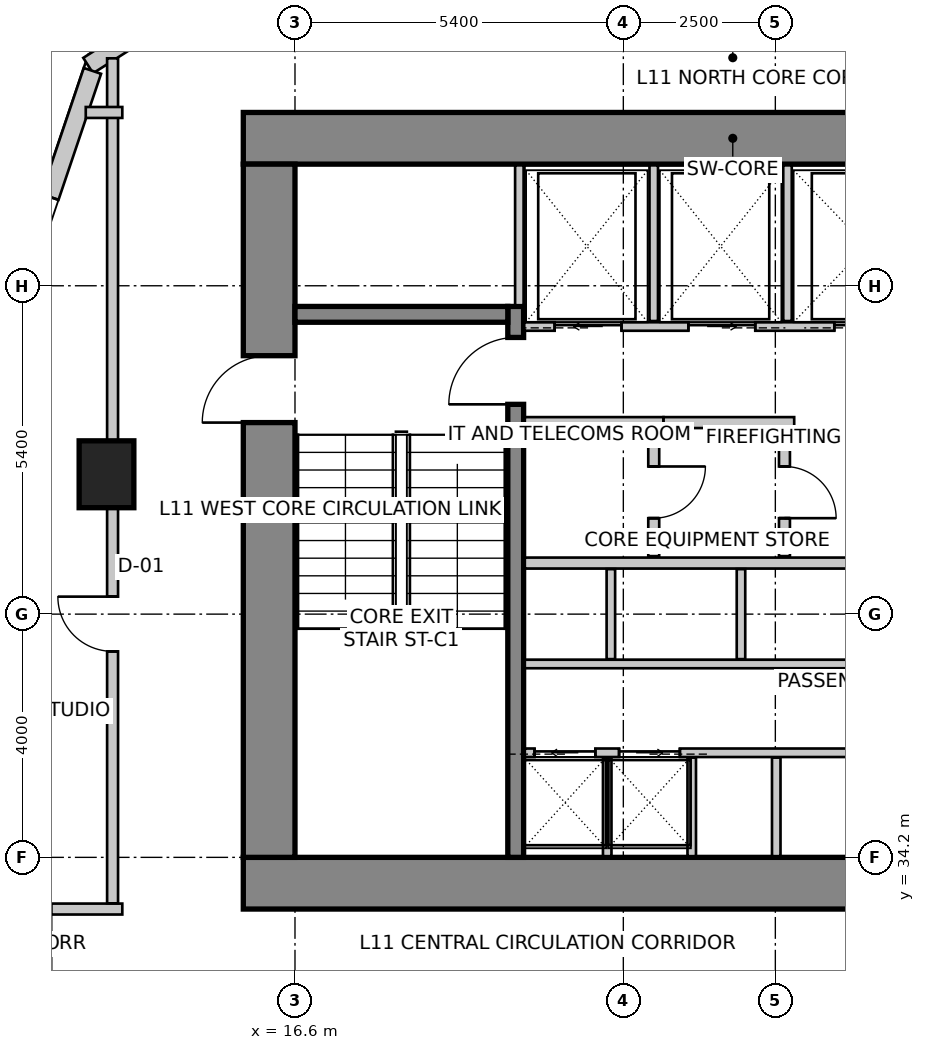
"""IFC4 building model, lengths in metres.
Left out: names, types, materials, properties, quantities, classifications, styles, units other than length and angle.
Written with IfcOpenShell. Run it as: python <this file> out.ifc"""

import sys

from ifc_helpers import new_model, si_unit, direction, frame, frame_2d, origin, origin_2d, place, context, subcontext, project, spatial, rectangle, extrude, source, transform, mapped, element, fill, save


model = new_model("IFC4")
c1 = context("Model", 3, precision=1e-05, world=origin(), true_north=direction((0.0, 1.0)))
c2 = subcontext(c1, "Body", "Model", "MODEL_VIEW")
j1 = project(units=[si_unit("LENGTHUNIT", "METRE"), si_unit("PLANEANGLEUNIT", "RADIAN")], contexts=[c1])
p1 = place(None, origin())
s1 = spatial("IfcSite", under=j1, at=p1, CompositionType="ELEMENT")
p2 = place(p1, origin())
s2 = spatial("IfcBuilding", under=s1, at=p2, CompositionType="ELEMENT")
p3 = place(p2, frame((0.0, 0.0, 47.0)))
s3 = spatial("IfcBuildingStorey", under=s2, at=p3, CompositionType="ELEMENT", Elevation=47.0)
p4 = place(p3, frame((15.75, 46.025, 0.0), z_axis=(0.0, 0.0, 1.0), x_axis=(1.0, 0.0, 0.0)))
e1 = element("IfcWall", 1, at=p4, inside=s3, PredefinedType="SHEAR", context=c2, shape_type="SweptSolid", body=[
    extrude(rectangle(XDim=16.1, YDim=0.85, at=frame_2d((8.05, 0.0))), origin(), (0.0, 0.0, 1.0), 4.0),
])
p5 = place(p3, frame((15.75, 33.775, 0.0), z_axis=(0.0, 0.0, 1.0), x_axis=(1.0, 0.0, 0.0)))
e2 = element("IfcWall", 2, at=p5, inside=s3, PredefinedType="SHEAR", context=c2, shape_type="SweptSolid", body=[
    extrude(rectangle(XDim=16.1, YDim=0.85, at=frame_2d((8.05, 0.0))), origin(), (0.0, 0.0, 1.0), 4.0),
])
m1 = source(origin(), c2, "Body", "SweptSolid", [
    extrude(rectangle(XDim=1.3, YDim=2.15, at=frame_2d((0.65, 1.075))), frame((0.0, 0.435, 0.0), z_axis=(0.0, -1.0, 0.0), x_axis=(1.0, 0.0, 0.0)), (0.0, 0.0, 1.0), 0.87),
])
p6 = place(p5, frame((10.18, 0.0, 0.0)))
e3 = element("IfcOpeningElement", 3, at=p6, cuts=e2, PredefinedType="OPENING", context=c2, shape_type="MappedRepresentation", body=[
    mapped(m1, transform((0.0, 0.0, 0.0), scale=1.0)),
])
p7 = place(p3, frame((16.175, 34.2, 0.0), z_axis=(0.0, 0.0, 1.0), x_axis=(0.0, 1.0, 0.0)))
e4 = element("IfcWall", 4, at=p7, inside=s3, PredefinedType="SHEAR", context=c2, shape_type="SweptSolid", body=[
    extrude(rectangle(XDim=11.4, YDim=0.85, at=frame_2d((5.7, 0.0))), origin(), (0.0, 0.0, 1.0), 4.0),
])
m2 = source(origin(), c2, "Body", "SweptSolid", [
    extrude(rectangle(XDim=1.1, YDim=2.15, at=frame_2d((0.55, 1.075))), frame((0.0, 0.435, 0.0), z_axis=(0.0, -1.0, 0.0), x_axis=(1.0, 0.0, 0.0)), (0.0, 0.0, 1.0), 0.87),
])
p8 = place(p7, frame((7.15, 0.0, 0.0)))
e5 = element("IfcOpeningElement", 5, at=p8, cuts=e4, PredefinedType="OPENING", context=c2, shape_type="MappedRepresentation", body=[
    mapped(m2, transform((0.0, 0.0, 0.0), scale=1.0)),
])
p9 = place(p3, frame((20.23, 34.2, 0.0), z_axis=(0.0, 0.0, 1.0), x_axis=(0.0, 1.0, 0.0)))
e6 = element("IfcWall", 6, at=p9, inside=s3, PredefinedType="SHEAR", context=c2, shape_type="SweptSolid", body=[
    extrude(rectangle(XDim=9.06, YDim=0.26, at=frame_2d((4.53, 0.0))), origin(), (0.0, 0.0, 1.0), 4.0),
])
m3 = source(origin(), c2, "Body", "SweptSolid", [
    extrude(rectangle(XDim=1.1, YDim=2.15, at=frame_2d((0.55, 1.075))), frame((0.0, 0.14, 0.0), z_axis=(0.0, -1.0, 0.0), x_axis=(1.0, 0.0, 0.0)), (0.0, 0.0, 1.0), 0.28),
])
p10 = place(p9, frame((7.45, 0.0, 0.0)))
e7 = element("IfcOpeningElement", 7, at=p10, cuts=e6, PredefinedType="OPENING", context=c2, shape_type="MappedRepresentation", body=[
    mapped(m3, transform((0.0, 0.0, 0.0), scale=1.0)),
])
p11 = place(p3, frame((16.6, 43.13, 0.0), z_axis=(0.0, 0.0, 1.0), x_axis=(1.0, 0.0, 0.0)))
e8 = element("IfcWall", 8, at=p11, inside=s3, PredefinedType="SHEAR", context=c2, shape_type="SweptSolid", body=[
    extrude(rectangle(XDim=3.5, YDim=0.26, at=frame_2d((1.75, 0.0))), origin(), (0.0, 0.0, 1.0), 4.0),
])
m4 = source(origin(), c2, "Body", "SweptSolid", [
    extrude(rectangle(XDim=0.9, YDim=1.1, at=origin_2d()), origin(), (0.0, 0.0, 1.0), 4.0),
])
p12 = place(p3, frame((13.5, 40.5, 0.0), z_axis=(0.0, 0.0, 1.0), x_axis=(1.0, 0.0, 0.0)))
e9 = element("IfcColumn", 9, at=p12, inside=s3, PredefinedType="COLUMN", context=c2, shape_type="MappedRepresentation", body=[
    mapped(m4, transform((0.0, 0.0, 0.0), scale=1.0)),
])
p13 = place(p3, frame((58.761, 46.648, 0.0), z_axis=(0.0, 0.0, 1.0), x_axis=(-0.98607502735, 0.166301053624, 0.0)))
e10 = element("IfcWall", 10, at=p13, inside=s3, PredefinedType="SOLIDWALL", context=c2, shape_type="SweptSolid", body=[
    extrude(rectangle(XDim=37.397, YDim=0.3, at=frame_2d((18.699, 0.0))), origin(), (0.0, 0.0, 1.0), 3.75),
])
m5 = source(origin(), c2, "Body", "SweptSolid", [
    extrude(rectangle(XDim=2.1, YDim=2.0, at=frame_2d((1.05, 1.0))), frame((0.0, 0.16, 0.0), z_axis=(0.0, -1.0, 0.0), x_axis=(1.0, 0.0, 0.0)), (0.0, 0.0, 1.0), 0.32),
])
p14 = place(p13, frame((0.626, 0.0, 0.85)))
e11 = element("IfcOpeningElement", 11, at=p14, cuts=e10, PredefinedType="OPENING", context=c2, shape_type="MappedRepresentation", body=[
    mapped(m5, transform((0.0, 0.0, 0.0), scale=1.0)),
])
m6 = source(origin(), c2, "Body", "SweptSolid", [
    extrude(rectangle(XDim=2.4, YDim=2.2, at=frame_2d((1.2, 1.1))), frame((0.0, 0.16, 0.0), z_axis=(0.0, -1.0, 0.0), x_axis=(1.0, 0.0, 0.0)), (0.0, 0.0, 1.0), 0.32),
])
p15 = place(p13, frame((4.571, 0.0, 0.85)))
e12 = element("IfcOpeningElement", 12, at=p15, cuts=e10, PredefinedType="OPENING", context=c2, shape_type="MappedRepresentation", body=[
    mapped(m6, transform((0.0, 0.0, 0.0), scale=1.0)),
])
m7 = source(origin(), c2, "Body", "SweptSolid", [
    extrude(rectangle(XDim=2.8, YDim=2.4, at=frame_2d((1.4, 1.2))), frame((0.0, 0.16, 0.0), z_axis=(0.0, -1.0, 0.0), x_axis=(1.0, 0.0, 0.0)), (0.0, 0.0, 1.0), 0.32),
])
p16 = place(p13, frame((8.969, 0.0, 0.85)))
e13 = element("IfcOpeningElement", 13, at=p16, cuts=e10, PredefinedType="OPENING", context=c2, shape_type="MappedRepresentation", body=[
    mapped(m7, transform((0.0, 0.0, 0.0), scale=1.0)),
])
p17 = place(p13, frame((13.766, 0.0, 0.85)))
e14 = element("IfcOpeningElement", 14, at=p17, cuts=e10, PredefinedType="OPENING", context=c2, shape_type="MappedRepresentation", body=[
    mapped(m6, transform((0.0, 0.0, 0.0), scale=1.0)),
])
p18 = place(p13, frame((19.099, 0.0, 0.85)))
e15 = element("IfcOpeningElement", 15, at=p18, cuts=e10, PredefinedType="OPENING", context=c2, shape_type="MappedRepresentation", body=[
    mapped(m6, transform((0.0, 0.0, 0.0), scale=1.0)),
])
p19 = place(p13, frame((24.086, 0.0, 0.85)))
e16 = element("IfcOpeningElement", 16, at=p19, cuts=e10, PredefinedType="OPENING", context=c2, shape_type="MappedRepresentation", body=[
    mapped(m7, transform((0.0, 0.0, 0.0), scale=1.0)),
])
p20 = place(p13, frame((29.957, 0.0, 0.85)))
e17 = element("IfcOpeningElement", 17, at=p20, cuts=e10, PredefinedType="OPENING", context=c2, shape_type="MappedRepresentation", body=[
    mapped(m6, transform((0.0, 0.0, 0.0), scale=1.0)),
])
p21 = place(p13, frame((34.456, 0.0, 0.85)))
e18 = element("IfcOpeningElement", 18, at=p21, cuts=e10, PredefinedType="OPENING", context=c2, shape_type="MappedRepresentation", body=[
    mapped(m6, transform((0.0, 0.0, 0.0), scale=1.0)),
])
p22 = place(p3, frame((21.875, 52.743, 0.0), z_axis=(0.0, 0.0, 1.0), x_axis=(-0.843647802826, -0.536896996441, 0.0)))
e19 = element("IfcWall", 19, at=p22, inside=s3, PredefinedType="SOLIDWALL", context=c2, shape_type="SweptSolid", body=[
    extrude(rectangle(XDim=10.284, YDim=0.3, at=frame_2d((5.142, 0.0))), origin(), (0.0, 0.0, 1.0), 3.75),
])
m8 = source(origin(), c2, "Body", "SweptSolid", [
    extrude(rectangle(XDim=1.2, YDim=1.6, at=frame_2d((0.6, 0.8))), frame((0.0, 0.16, 0.0), z_axis=(0.0, -1.0, 0.0), x_axis=(1.0, 0.0, 0.0)), (0.0, 0.0, 1.0), 0.32),
])
p23 = place(p22, frame((0.479, 0.0, 0.85)))
e20 = element("IfcOpeningElement", 20, at=p23, cuts=e19, PredefinedType="OPENING", context=c2, shape_type="MappedRepresentation", body=[
    mapped(m8, transform((0.0, 0.0, 0.0), scale=1.0)),
])
p24 = place(p22, frame((3.342, 0.0, 0.85)))
e21 = element("IfcOpeningElement", 21, at=p24, cuts=e19, PredefinedType="OPENING", context=c2, shape_type="MappedRepresentation", body=[
    mapped(m7, transform((0.0, 0.0, 0.0), scale=1.0)),
])
m9 = source(origin(), c2, "Body", "SweptSolid", [
    extrude(rectangle(XDim=1.8, YDim=2.1, at=frame_2d((0.9, 1.05))), frame((0.0, 0.16, 0.0), z_axis=(0.0, -1.0, 0.0), x_axis=(1.0, 0.0, 0.0)), (0.0, 0.0, 1.0), 0.32),
])
p25 = place(p22, frame((7.754, 0.0, 0.85)))
e22 = element("IfcOpeningElement", 22, at=p25, cuts=e19, PredefinedType="OPENING", context=c2, shape_type="MappedRepresentation", body=[
    mapped(m9, transform((0.0, 0.0, 0.0), scale=1.0)),
])
p26 = place(p3, frame((13.269, 47.134, 0.0), z_axis=(0.0, 0.0, 1.0), x_axis=(-0.319920423265, -0.947444416722, 0.0)))
e23 = element("IfcWall", 23, at=p26, inside=s3, PredefinedType="SOLIDWALL", context=c2, shape_type="SweptSolid", body=[
    extrude(rectangle(XDim=16.135, YDim=0.3, at=frame_2d((8.067, 0.0))), origin(), (0.0, 0.0, 1.0), 3.75),
])
p27 = place(p26, frame((2.188, 0.0, 0.85)))
e24 = element("IfcOpeningElement", 24, at=p27, cuts=e23, PredefinedType="OPENING", context=c2, shape_type="MappedRepresentation", body=[
    mapped(m6, transform((0.0, 0.0, 0.0), scale=1.0)),
])
p28 = place(p26, frame((6.959, 0.0, 0.85)))
e25 = element("IfcOpeningElement", 25, at=p28, cuts=e23, PredefinedType="OPENING", context=c2, shape_type="MappedRepresentation", body=[
    mapped(m7, transform((0.0, 0.0, 0.0), scale=1.0)),
])
p29 = place(p26, frame((12.13, 0.0, 0.85)))
e26 = element("IfcOpeningElement", 26, at=p29, cuts=e23, PredefinedType="OPENING", context=c2, shape_type="MappedRepresentation", body=[
    mapped(m6, transform((0.0, 0.0, 0.0), scale=1.0)),
])
p30 = place(p3, frame((20.37, 42.93, 0.0), z_axis=(0.0, 0.0, 1.0), x_axis=(1.0, 0.0, 0.0)))
e27 = element("IfcWall", 27, at=p30, inside=s3, PredefinedType="SOLIDWALL", context=c2, shape_type="SweptSolid", body=[
    extrude(rectangle(XDim=6.86, YDim=0.14, at=frame_2d((3.43, 0.0))), origin(), (0.0, 0.0, 1.0), 3.75),
])
m10 = source(origin(), c2, "Body", "SweptSolid", [
    extrude(rectangle(XDim=1.1, YDim=2.15, at=frame_2d((0.55, 1.075))), frame((0.0, 0.08, 0.0), z_axis=(0.0, -1.0, 0.0), x_axis=(1.0, 0.0, 0.0)), (0.0, 0.0, 1.0), 0.16),
])
p31 = place(p30, frame((0.5, 0.0, 0.0)))
e28 = element("IfcOpeningElement", 28, at=p31, cuts=e27, PredefinedType="OPENING", context=c2, shape_type="MappedRepresentation", body=[
    mapped(m10, transform((0.0, 0.0, 0.0), scale=1.0)),
])
p32 = place(p30, frame((2.7, 0.0, 0.0)))
e29 = element("IfcOpeningElement", 29, at=p32, cuts=e27, PredefinedType="OPENING", context=c2, shape_type="MappedRepresentation", body=[
    mapped(m10, transform((0.0, 0.0, 0.0), scale=1.0)),
])
p33 = place(p30, frame((5.1, 0.0, 0.0)))
e30 = element("IfcOpeningElement", 30, at=p33, cuts=e27, PredefinedType="OPENING", context=c2, shape_type="MappedRepresentation", body=[
    mapped(m10, transform((0.0, 0.0, 0.0), scale=1.0)),
])
p34 = place(p3, frame((20.29, 43.28, 0.0), z_axis=(0.0, 0.0, 1.0), x_axis=(0.0, 1.0, 0.0)))
e31 = element("IfcWall", 31, at=p34, inside=s3, PredefinedType="SOLIDWALL", context=c2, shape_type="SweptSolid", body=[
    extrude(rectangle(XDim=2.3, YDim=0.14, at=frame_2d((1.15, 0.0))), origin(), (0.0, 0.0, 1.0), 3.75),
])
for number, where, z_axis, x_axis in (
    (32, (22.5, 43.02, 0.0), (0.0, 0.0, 1.0), (0.0, 1.0, 0.0)),
    (33, (24.7, 43.02, 0.0), (0.0, 0.0, 1.0), (0.0, 1.0, 0.0)),
):
    element("IfcWall", number, at=place(p3, frame(where, z_axis=z_axis, x_axis=x_axis)), inside=s3, PredefinedType="SOLIDWALL", context=c2, shape_type="SweptSolid", body=[
        extrude(rectangle(XDim=2.56, YDim=0.14, at=frame_2d((1.28, 0.0))), origin(), (0.0, 0.0, 1.0), 3.75),
    ])
p35 = place(p3, frame((20.38, 35.92, 0.0), z_axis=(0.0, 0.0, 1.0), x_axis=(1.0, 0.0, 0.0)))
e34 = element("IfcWall", 34, at=p35, inside=s3, PredefinedType="SOLIDWALL", context=c2, shape_type="SweptSolid", body=[
    extrude(rectangle(XDim=5.65, YDim=0.14, at=frame_2d((2.825, 0.0))), origin(), (0.0, 0.0, 1.0), 3.75),
])
m11 = source(origin(), c2, "Body", "SweptSolid", [
    extrude(rectangle(XDim=1.0, YDim=2.15, at=frame_2d((0.5, 1.075))), frame((0.0, 0.08, 0.0), z_axis=(0.0, -1.0, 0.0), x_axis=(1.0, 0.0, 0.0)), (0.0, 0.0, 1.0), 0.16),
])
p36 = place(p35, frame((0.16, 0.0, 0.0)))
e35 = element("IfcOpeningElement", 35, at=p36, cuts=e34, PredefinedType="OPENING", context=c2, shape_type="MappedRepresentation", body=[
    mapped(m11, transform((0.0, 0.0, 0.0), scale=1.0)),
])
p37 = place(p35, frame((1.55, 0.0, 0.0)))
e36 = element("IfcOpeningElement", 36, at=p37, cuts=e34, PredefinedType="OPENING", context=c2, shape_type="MappedRepresentation", body=[
    mapped(m11, transform((0.0, 0.0, 0.0), scale=1.0)),
])
for number, where, z_axis, x_axis in (
    (37, (21.735, 34.22, 0.0), (0.0, 0.0, 1.0), (0.0, 1.0, 0.0)),
    (38, (23.125, 34.22, 0.0), (0.0, 0.0, 1.0), (0.0, 1.0, 0.0)),
    (39, (24.515, 34.22, 0.0), (0.0, 0.0, 1.0), (0.0, 1.0, 0.0)),
):
    element("IfcWall", number, at=place(p3, frame(where, z_axis=z_axis, x_axis=x_axis)), inside=s3, PredefinedType="SOLIDWALL", context=c2, shape_type="SweptSolid", body=[
        extrude(rectangle(XDim=1.62, YDim=0.14, at=frame_2d((0.81, 0.0))), origin(), (0.0, 0.0, 1.0), 3.042),
    ])
p38 = place(p3, frame((20.38, 37.38, 0.0), z_axis=(0.0, 0.0, 1.0), x_axis=(1.0, 0.0, 0.0)))
e40 = element("IfcWall", 40, at=p38, inside=s3, PredefinedType="SOLIDWALL", context=c2, shape_type="SweptSolid", body=[
    extrude(rectangle(XDim=5.75, YDim=0.14, at=frame_2d((2.875, 0.0))), origin(), (0.0, 0.0, 1.0), 3.75),
])
p39 = place(p3, frame((20.38, 39.04, 0.0), z_axis=(0.0, 0.0, 1.0), x_axis=(1.0, 0.0, 0.0)))
e41 = element("IfcWall", 41, at=p39, inside=s3, PredefinedType="SOLIDWALL", context=c2, shape_type="SweptSolid", body=[
    extrude(rectangle(XDim=5.75, YDim=0.18, at=frame_2d((2.875, 0.0))), origin(), (0.0, 0.0, 1.0), 3.75),
])
for number, where, z_axis, x_axis in (
    (42, (21.795, 37.46, 0.0), (0.0, 0.0, 1.0), (0.0, 1.0, 0.0)),
    (43, (23.935, 37.46, 0.0), (0.0, 0.0, 1.0), (0.0, 1.0, 0.0)),
):
    element("IfcWall", number, at=place(p3, frame(where, z_axis=z_axis, x_axis=x_axis)), inside=s3, PredefinedType="SOLIDWALL", context=c2, shape_type="SweptSolid", body=[
        extrude(rectangle(XDim=1.48, YDim=0.14, at=frame_2d((0.74, 0.0))), origin(), (0.0, 0.0, 1.0), 3.75),
    ])
p40 = place(p3, frame((22.66, 41.35, 0.0), z_axis=(0.0, 0.0, 1.0), x_axis=(-1.0, 0.0, 0.0)))
e44 = element("IfcWall", 44, at=p40, inside=s3, PredefinedType="PARTITIONING", context=c2, shape_type="SweptSolid", body=[
    extrude(rectangle(XDim=2.28, YDim=0.18, at=frame_2d((1.14, 0.0))), origin(), (0.0, 0.0, 1.0), 3.75),
])
p41 = place(p3, frame((24.81, 41.35, 0.0), z_axis=(0.0, 0.0, 1.0), x_axis=(-1.0, 0.0, 0.0)))
e45 = element("IfcWall", 45, at=p41, inside=s3, PredefinedType="PARTITIONING", context=c2, shape_type="SweptSolid", body=[
    extrude(rectangle(XDim=2.148, YDim=0.18, at=frame_2d((1.074, 0.0))), origin(), (0.0, 0.0, 1.0), 3.75),
])
p42 = place(p3, frame((22.5, 41.256, 0.0), z_axis=(0.0, 0.0, 1.0), x_axis=(0.0, -1.0, 0.0)))
e46 = element("IfcWall", 46, at=p42, inside=s3, PredefinedType="PARTITIONING", context=c2, shape_type="SweptSolid", body=[
    extrude(rectangle(XDim=2.106, YDim=0.18, at=frame_2d((1.053, 0.0))), origin(), (0.0, 0.0, 1.0), 3.75),
])
m12 = source(origin(), c2, "Body", "SweptSolid", [
    extrude(rectangle(XDim=0.85, YDim=2.15, at=frame_2d((0.425, 1.075))), frame((0.0, 0.1, 0.0), z_axis=(0.0, -1.0, 0.0), x_axis=(1.0, 0.0, 0.0)), (0.0, 0.0, 1.0), 0.2),
])
p43 = place(p42, frame((0.628, 0.0, 0.0)))
e47 = element("IfcOpeningElement", 47, at=p43, cuts=e46, PredefinedType="OPENING", context=c2, shape_type="MappedRepresentation", body=[
    mapped(m12, transform((0.0, 0.0, 0.0), scale=1.0)),
])
p44 = place(p3, frame((24.65, 41.256, 0.0), z_axis=(0.0, 0.0, 1.0), x_axis=(0.0, -1.0, 0.0)))
e48 = element("IfcWall", 48, at=p44, inside=s3, PredefinedType="PARTITIONING", context=c2, shape_type="SweptSolid", body=[
    extrude(rectangle(XDim=2.106, YDim=0.18, at=frame_2d((1.053, 0.0))), origin(), (0.0, 0.0, 1.0), 3.75),
])
p45 = place(p44, frame((0.628, 0.0, 0.0)))
e49 = element("IfcOpeningElement", 49, at=p45, cuts=e48, PredefinedType="OPENING", context=c2, shape_type="MappedRepresentation", body=[
    mapped(m12, transform((0.0, 0.0, 0.0), scale=1.0)),
])
p46 = place(p3, frame((12.594, 33.35, 0.0), z_axis=(0.0, 0.0, 1.0), x_axis=(1.0, 0.0, 0.0)))
e50 = element("IfcWall", 50, at=p46, inside=s3, PredefinedType="PARTITIONING", context=c2, shape_type="SweptSolid", body=[
    extrude(rectangle(XDim=1.166, YDim=0.18, at=frame_2d((0.583, 0.0))), origin(), (0.0, 0.0, 1.0), 3.75),
])
p47 = place(p3, frame((13.6, 33.444, 0.0), z_axis=(0.0, 0.0, 1.0), x_axis=(0.0, 1.0, 0.0)))
e51 = element("IfcWall", 51, at=p47, inside=s3, PredefinedType="PARTITIONING", context=c2, shape_type="SweptSolid", body=[
    extrude(rectangle(XDim=13.896, YDim=0.18, at=frame_2d((6.948, 0.0))), origin(), (0.0, 0.0, 1.0), 2.892),
])
m13 = source(origin(), c2, "Body", "SweptSolid", [
    extrude(rectangle(XDim=0.9, YDim=2.15, at=frame_2d((0.45, 1.075))), frame((0.0, 0.1, 0.0), z_axis=(0.0, -1.0, 0.0), x_axis=(1.0, 0.0, 0.0)), (0.0, 0.0, 1.0), 0.2),
])
p48 = place(p47, frame((4.144, 0.0, 0.0)))
e52 = element("IfcOpeningElement", 52, at=p48, cuts=e51, PredefinedType="OPENING", context=c2, shape_type="MappedRepresentation", body=[
    mapped(m13, transform((0.0, 0.0, 0.0), scale=1.0)),
])
p49 = place(p3, frame((13.76, 46.45, 0.0), z_axis=(0.0, 0.0, 1.0), x_axis=(-1.0, 0.0, 0.0)))
e53 = element("IfcWall", 53, at=p49, inside=s3, PredefinedType="PARTITIONING", context=c2, shape_type="SweptSolid", body=[
    extrude(rectangle(XDim=0.601, YDim=0.18, at=frame_2d((0.301, 0.0))), origin(), (0.0, 0.0, 1.0), 3.75),
])
m14 = source(origin(), c2, "Body", "SweptSolid", [
    extrude(rectangle(XDim=1.1, YDim=2.15, at=frame_2d((0.55, 1.075))), frame((0.0, 0.025, 0.0), z_axis=(0.0, -1.0, 0.0), x_axis=(1.0, 0.0, 0.0)), (0.0, 0.0, 1.0), 0.05),
])
p50 = place(p31, origin())
e54 = element("IfcDoor", 54, at=p50, inside=s3, OperationType="SLIDING_TO_LEFT", PredefinedType="DOOR", context=c2, shape_type="MappedRepresentation", body=[
    mapped(m14, transform((0.0, 0.0, 0.0), scale=1.0)),
])
fill(e28, e54)
p51 = place(p32, origin())
e55 = element("IfcDoor", 55, at=p51, inside=s3, OperationType="SLIDING_TO_RIGHT", PredefinedType="DOOR", context=c2, shape_type="MappedRepresentation", body=[
    mapped(m14, transform((0.0, 0.0, 0.0), scale=1.0)),
])
fill(e29, e55)
m15 = source(origin(), c2, "Body", "SweptSolid", [
    extrude(rectangle(XDim=1.1, YDim=2.15, at=frame_2d((0.55, 1.075))), frame((0.0, 0.025, 0.0), z_axis=(0.0, -1.0, 0.0), x_axis=(1.0, 0.0, 0.0)), (0.0, 0.0, 1.0), 0.05),
])
p52 = place(p33, origin())
e56 = element("IfcDoor", 56, at=p52, inside=s3, OperationType="SLIDING_TO_LEFT", PredefinedType="DOOR", context=c2, shape_type="MappedRepresentation", body=[
    mapped(m15, transform((0.0, 0.0, 0.0), scale=1.0)),
])
fill(e30, e56)
m16 = source(origin(), c2, "Body", "SweptSolid", [
    extrude(rectangle(XDim=1.0, YDim=2.15, at=frame_2d((0.5, 1.075))), frame((0.0, 0.025, 0.0), z_axis=(0.0, -1.0, 0.0), x_axis=(1.0, 0.0, 0.0)), (0.0, 0.0, 1.0), 0.05),
])
p53 = place(p36, origin())
e57 = element("IfcDoor", 57, at=p53, inside=s3, OperationType="SLIDING_TO_LEFT", PredefinedType="DOOR", context=c2, shape_type="MappedRepresentation", body=[
    mapped(m16, transform((0.0, 0.0, 0.0), scale=1.0)),
])
fill(e35, e57)
p54 = place(p37, origin())
e58 = element("IfcDoor", 58, at=p54, inside=s3, OperationType="SLIDING_TO_RIGHT", PredefinedType="DOOR", context=c2, shape_type="MappedRepresentation", body=[
    mapped(m16, transform((0.0, 0.0, 0.0), scale=1.0)),
])
fill(e36, e58)
m17 = source(origin(), c2, "Body", "SweptSolid", [
    extrude(rectangle(XDim=1.1, YDim=2.15, at=frame_2d((0.55, 1.075))), frame((0.0, 0.025, 0.0), z_axis=(0.0, -1.0, 0.0), x_axis=(1.0, 0.0, 0.0)), (0.0, 0.0, 1.0), 0.05),
])
p55 = place(p10, origin())
e59 = element("IfcDoor", 59, at=p55, inside=s3, OperationType="SINGLE_SWING_LEFT", PredefinedType="DOOR", context=c2, shape_type="MappedRepresentation", body=[
    mapped(m17, transform((0.0, 0.0, 0.0), scale=1.0)),
])
fill(e7, e59)
p56 = place(p8, origin())
e60 = element("IfcDoor", 60, at=p56, inside=s3, OperationType="SINGLE_SWING_LEFT", PredefinedType="DOOR", context=c2, shape_type="MappedRepresentation", body=[
    mapped(m17, transform((0.0, 0.0, 0.0), scale=1.0)),
])
fill(e5, e60)
m18 = source(origin(), c2, "Body", "SweptSolid", [
    extrude(rectangle(XDim=0.85, YDim=2.15, at=frame_2d((0.425, 1.075))), frame((0.0, 0.025, 0.0), z_axis=(0.0, -1.0, 0.0), x_axis=(1.0, 0.0, 0.0)), (0.0, 0.0, 1.0), 0.05),
])
p57 = place(p43, origin())
e61 = element("IfcDoor", 61, at=p57, inside=s3, OperationType="SINGLE_SWING_LEFT", PredefinedType="DOOR", context=c2, shape_type="MappedRepresentation", body=[
    mapped(m18, transform((0.0, 0.0, 0.0), scale=1.0)),
])
fill(e47, e61)
p58 = place(p45, origin())
e62 = element("IfcDoor", 62, at=p58, inside=s3, OperationType="SINGLE_SWING_RIGHT", PredefinedType="DOOR", context=c2, shape_type="MappedRepresentation", body=[
    mapped(m18, transform((0.0, 0.0, 0.0), scale=1.0)),
])
fill(e49, e62)
m19 = source(origin(), c2, "Body", "SweptSolid", [
    extrude(rectangle(XDim=0.9, YDim=2.15, at=frame_2d((0.45, 1.075))), frame((0.0, 0.025, 0.0), z_axis=(0.0, -1.0, 0.0), x_axis=(1.0, 0.0, 0.0)), (0.0, 0.0, 1.0), 0.05),
])
p59 = place(p48, origin())
e63 = element("IfcDoor", 63, at=p59, inside=s3, OperationType="SINGLE_SWING_RIGHT", PredefinedType="DOOR", context=c2, shape_type="MappedRepresentation", body=[
    mapped(m19, transform((0.0, 0.0, 0.0), scale=1.0)),
])
fill(e52, e63)
save(model, sys.argv[1])
